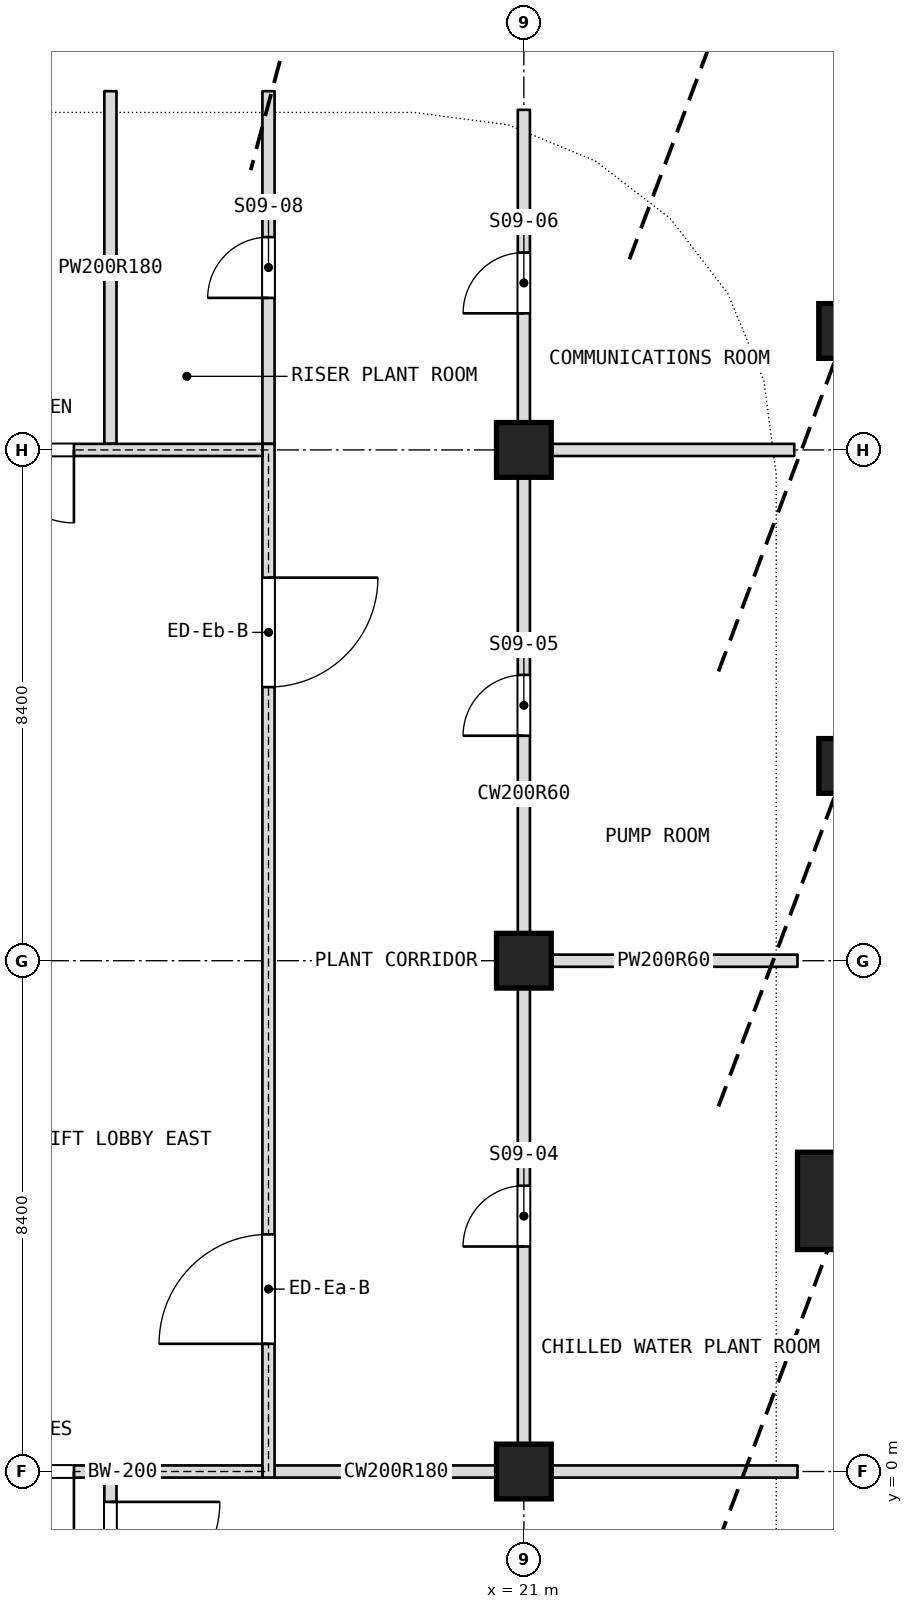
"""IFC4 building model, lengths in metres.
Left out: names, types, materials, properties, quantities, classifications, styles, units other than length and angle.
Written with IfcOpenShell. Run it as: python <this file> out.ifc"""

import sys

from ifc_helpers import new_model, si_unit, direction, frame, frame_2d, origin, origin_2d, place, context, subcontext, project, spatial, rectangle, extrude, element, fill, save


model = new_model("IFC4")
c1 = context("Model", 3, precision=1e-05, world=origin(), true_north=direction((0.0, 1.0)))
c2 = subcontext(c1, "Body", "Model", "MODEL_VIEW")
j1 = project(units=[si_unit("LENGTHUNIT", "METRE"), si_unit("PLANEANGLEUNIT", "RADIAN")], contexts=[c1])
p1 = place(None, origin())
s1 = spatial("IfcSite", under=j1, at=p1, CompositionType="ELEMENT")
p2 = place(p1, origin())
s2 = spatial("IfcBuilding", under=s1, at=p2, CompositionType="ELEMENT")
p3 = place(p2, frame((0.0, 0.0, 169.7)))
s3 = spatial("IfcBuildingStorey", under=s2, at=p3, CompositionType="ELEMENT", Elevation=169.7)
for number, where, z_axis, x_axis in (
    (1, (21.0, 0.0, 0.0), (0.0, 0.0, 1.0), (1.0, 0.0, 0.0)),
    (2, (21.0, 8.4, 0.0), (0.0, 0.0, 1.0), (1.0, 0.0, 0.0)),
    (3, (21.0, 16.8, 0.0), (0.0, 0.0, 1.0), (1.0, 0.0, 0.0)),
):
    element("IfcColumn", number, at=place(p3, frame(where, z_axis=z_axis, x_axis=x_axis)), inside=s3, PredefinedType="COLUMN", context=c2, shape_type="SweptSolid", body=[
        extrude(rectangle(XDim=0.9, YDim=0.9, at=origin_2d()), origin(), (0.0, 0.0, 1.0), 10.8),
    ])
p4 = place(p3, frame((21.0, -0.1, 0.0), z_axis=(0.0, 0.0, 1.0), x_axis=(0.0, 1.0, 0.0)))
e4 = element("IfcWall", 4, at=p4, inside=s3, PredefinedType="PARTITIONING", context=c2, shape_type="SweptSolid", body=[
    extrude(rectangle(XDim=22.493, YDim=0.2, at=frame_2d((11.247, 0.0))), origin(), (0.0, 0.0, 1.0), 10.14),
])
p5 = place(p4, frame((3.8, 0.0, 0.0)))
e5 = element("IfcOpeningElement", 5, at=p5, cuts=e4, PredefinedType="OPENING", context=c2, shape_type="SweptSolid", body=[
    extrude(rectangle(XDim=1.0, YDim=2.1, at=frame_2d((0.5, 1.05))), frame((0.0, 0.1, 0.0), z_axis=(0.0, -1.0, 0.0), x_axis=(1.0, 0.0, 0.0)), (0.0, 0.0, 1.0), 0.2),
])
p6 = place(p4, frame((12.2, 0.0, 0.0)))
e6 = element("IfcOpeningElement", 6, at=p6, cuts=e4, PredefinedType="OPENING", context=c2, shape_type="SweptSolid", body=[
    extrude(rectangle(XDim=1.0, YDim=2.1, at=frame_2d((0.5, 1.05))), frame((0.0, 0.1, 0.0), z_axis=(0.0, -1.0, 0.0), x_axis=(1.0, 0.0, 0.0)), (0.0, 0.0, 1.0), 0.2),
])
p7 = place(p4, frame((19.146, 0.0, 0.0)))
e7 = element("IfcOpeningElement", 7, at=p7, cuts=e4, PredefinedType="OPENING", context=c2, shape_type="SweptSolid", body=[
    extrude(rectangle(XDim=1.0, YDim=2.1, at=frame_2d((0.5, 1.05))), frame((0.0, 0.1, 0.0), z_axis=(0.0, -1.0, 0.0), x_axis=(1.0, 0.0, 0.0)), (0.0, 0.0, 1.0), 0.2),
])
p8 = place(p3, frame((16.8, 16.9, 0.0), z_axis=(0.0, 0.0, 1.0), x_axis=(0.0, 1.0, 0.0)))
e8 = element("IfcWall", 8, at=p8, inside=s3, PredefinedType="PARTITIONING", context=c2, shape_type="SweptSolid", body=[
    extrude(rectangle(XDim=5.8, YDim=0.2, at=frame_2d((2.9, 0.0))), origin(), (0.0, 0.0, 1.0), 10.14),
])
p9 = place(p8, frame((2.4, 0.0, 0.0)))
e9 = element("IfcOpeningElement", 9, at=p9, cuts=e8, PredefinedType="OPENING", context=c2, shape_type="SweptSolid", body=[
    extrude(rectangle(XDim=1.0, YDim=2.1, at=frame_2d((0.5, 1.05))), frame((0.0, 0.1, 0.0), z_axis=(0.0, -1.0, 0.0), x_axis=(1.0, 0.0, 0.0)), (0.0, 0.0, 1.0), 0.2),
])
p10 = place(p3, frame((14.2, -22.875, 0.0), z_axis=(0.0, 0.0, 1.0), x_axis=(0.0, 1.0, 0.0)))
e10 = element("IfcWall", 10, at=p10, inside=s3, PredefinedType="PARTITIONING", context=c2, shape_type="SweptSolid", body=[
    extrude(rectangle(XDim=22.775, YDim=0.2, at=frame_2d((11.387, 0.0))), origin(), (0.0, 0.0, 1.0), 10.54),
])
p11 = place(p10, frame((20.575, 0.0, 0.0)))
e11 = element("IfcOpeningElement", 11, at=p11, cuts=e10, PredefinedType="OPENING", context=c2, shape_type="SweptSolid", body=[
    extrude(rectangle(XDim=1.8, YDim=2.1, at=frame_2d((0.9, 1.05))), frame((0.0, 0.1, 0.0), z_axis=(0.0, -1.0, 0.0), x_axis=(1.0, 0.0, 0.0)), (0.0, 0.0, 1.0), 0.2),
])
p12 = place(p3, frame((14.2, 16.9, 0.0), z_axis=(0.0, 0.0, 1.0), x_axis=(0.0, 1.0, 0.0)))
e12 = element("IfcWall", 12, at=p12, inside=s3, PredefinedType="PARTITIONING", context=c2, shape_type="SweptSolid", body=[
    extrude(rectangle(XDim=5.8, YDim=0.2, at=frame_2d((2.9, 0.0))), origin(), (0.0, 0.0, 1.0), 10.54),
])
p13 = place(p3, frame((21.1, 0.0, 0.0), z_axis=(0.0, 0.0, 1.0), x_axis=(1.0, 0.0, 0.0)))
e13 = element("IfcWall", 13, at=p13, inside=s3, PredefinedType="PARTITIONING", context=c2, shape_type="SweptSolid", body=[
    extrude(rectangle(XDim=4.4, YDim=0.2, at=frame_2d((2.2, 0.0))), origin(), (0.0, 0.0, 1.0), 10.14),
])
p14 = place(p3, frame((16.9, 0.0, 0.0), z_axis=(0.0, 0.0, 1.0), x_axis=(1.0, 0.0, 0.0)))
e14 = element("IfcWall", 14, at=p14, inside=s3, PredefinedType="PARTITIONING", context=c2, shape_type="SweptSolid", body=[
    extrude(rectangle(XDim=4.0, YDim=0.2, at=frame_2d((2.0, 0.0))), origin(), (0.0, 0.0, 1.0), 10.14),
])
p15 = place(p3, frame((21.1, 8.4, 0.0), z_axis=(0.0, 0.0, 1.0), x_axis=(1.0, 0.0, 0.0)))
e15 = element("IfcWall", 15, at=p15, inside=s3, PredefinedType="PARTITIONING", context=c2, shape_type="SweptSolid", body=[
    extrude(rectangle(XDim=4.4, YDim=0.2, at=frame_2d((2.2, 0.0))), origin(), (0.0, 0.0, 1.0), 10.14),
])
p16 = place(p3, frame((21.1, 16.8, 0.0), z_axis=(0.0, 0.0, 1.0), x_axis=(1.0, 0.0, 0.0)))
e16 = element("IfcWall", 16, at=p16, inside=s3, PredefinedType="PARTITIONING", context=c2, shape_type="SweptSolid", body=[
    extrude(rectangle(XDim=4.347, YDim=0.2, at=frame_2d((2.173, 0.0))), origin(), (0.0, 0.0, 1.0), 10.14),
])
p17 = place(p3, frame((16.8, -0.1, 0.0), z_axis=(0.0, 0.0, 1.0), x_axis=(0.0, 1.0, 0.0)))
e17 = element("IfcWall", 17, at=p17, inside=s3, PredefinedType="PARTITIONING", context=c2, shape_type="SweptSolid", body=[
    extrude(rectangle(XDim=17.0, YDim=0.2, at=frame_2d((8.5, 0.0))), origin(), (0.0, 0.0, 1.0), 10.54),
])
p18 = place(p17, frame((2.2, 0.0, 0.0)))
e18 = element("IfcOpeningElement", 18, at=p18, cuts=e17, PredefinedType="OPENING", context=c2, shape_type="SweptSolid", body=[
    extrude(rectangle(XDim=1.8, YDim=2.1, at=frame_2d((0.9, 1.05))), frame((0.0, 0.1, 0.0), z_axis=(0.0, -1.0, 0.0), x_axis=(1.0, 0.0, 0.0)), (0.0, 0.0, 1.0), 0.2),
])
p19 = place(p17, frame((13.0, 0.0, 0.0)))
e19 = element("IfcOpeningElement", 19, at=p19, cuts=e17, PredefinedType="OPENING", context=c2, shape_type="SweptSolid", body=[
    extrude(rectangle(XDim=1.8, YDim=2.1, at=frame_2d((0.9, 1.05))), frame((0.0, 0.1, 0.0), z_axis=(0.0, -1.0, 0.0), x_axis=(1.0, 0.0, 0.0)), (0.0, 0.0, 1.0), 0.2),
])
p20 = place(p3, frame((12.1, 0.0, 0.0), z_axis=(0.0, 0.0, 1.0), x_axis=(1.0, 0.0, 0.0)))
e20 = element("IfcWall", 20, at=p20, inside=s3, PredefinedType="PARTITIONING", context=c2, shape_type="SweptSolid", body=[
    extrude(rectangle(XDim=4.6, YDim=0.2, at=frame_2d((2.3, 0.0))), origin(), (0.0, 0.0, 1.0), 10.14),
])
p21 = place(p20, frame((0.3, 0.0, 0.0)))
e21 = element("IfcOpeningElement", 21, at=p21, cuts=e20, PredefinedType="OPENING", context=c2, shape_type="SweptSolid", body=[
    extrude(rectangle(XDim=1.2, YDim=2.1, at=frame_2d((0.6, 1.05))), frame((0.0, 0.1, 0.0), z_axis=(0.0, -1.0, 0.0), x_axis=(1.0, 0.0, 0.0)), (0.0, 0.0, 1.0), 0.2),
])
p22 = place(p3, frame((12.1, 16.8, 0.0), z_axis=(0.0, 0.0, 1.0), x_axis=(1.0, 0.0, 0.0)))
e22 = element("IfcWall", 22, at=p22, inside=s3, PredefinedType="PARTITIONING", context=c2, shape_type="SweptSolid", body=[
    extrude(rectangle(XDim=4.6, YDim=0.2, at=frame_2d((2.3, 0.0))), origin(), (0.0, 0.0, 1.0), 10.14),
])
p23 = place(p22, frame((0.3, 0.0, 0.0)))
e23 = element("IfcOpeningElement", 23, at=p23, cuts=e22, PredefinedType="OPENING", context=c2, shape_type="SweptSolid", body=[
    extrude(rectangle(XDim=1.2, YDim=2.1, at=frame_2d((0.6, 1.05))), frame((0.0, 0.1, 0.0), z_axis=(0.0, -1.0, 0.0), x_axis=(1.0, 0.0, 0.0)), (0.0, 0.0, 1.0), 0.2),
])
p24 = place(p5, origin())
e24 = element("IfcDoor", 24, at=p24, inside=s3, OperationType="SINGLE_SWING_LEFT", PredefinedType="DOOR", context=c2, shape_type="SweptSolid", body=[
    extrude(rectangle(XDim=1.0, YDim=2.1, at=frame_2d((0.5, 1.05))), frame((0.0, 0.025, 0.0), z_axis=(0.0, -1.0, 0.0), x_axis=(1.0, 0.0, 0.0)), (0.0, 0.0, 1.0), 0.05),
])
fill(e5, e24)
p25 = place(p6, origin())
e25 = element("IfcDoor", 25, at=p25, inside=s3, OperationType="SINGLE_SWING_RIGHT", PredefinedType="DOOR", context=c2, shape_type="SweptSolid", body=[
    extrude(rectangle(XDim=1.0, YDim=2.1, at=frame_2d((0.5, 1.05))), frame((0.0, 0.025, 0.0), z_axis=(0.0, -1.0, 0.0), x_axis=(1.0, 0.0, 0.0)), (0.0, 0.0, 1.0), 0.05),
])
fill(e6, e25)
p26 = place(p7, origin())
e26 = element("IfcDoor", 26, at=p26, inside=s3, OperationType="SINGLE_SWING_LEFT", PredefinedType="DOOR", context=c2, shape_type="SweptSolid", body=[
    extrude(rectangle(XDim=1.0, YDim=2.1, at=frame_2d((0.5, 1.05))), frame((0.0, 0.025, 0.0), z_axis=(0.0, -1.0, 0.0), x_axis=(1.0, 0.0, 0.0)), (0.0, 0.0, 1.0), 0.05),
])
fill(e7, e26)
p27 = place(p9, origin())
e27 = element("IfcDoor", 27, at=p27, inside=s3, OperationType="SINGLE_SWING_RIGHT", PredefinedType="DOOR", context=c2, shape_type="SweptSolid", body=[
    extrude(rectangle(XDim=1.0, YDim=2.1, at=frame_2d((0.5, 1.05))), frame((0.0, 0.025, 0.0), z_axis=(0.0, -1.0, 0.0), x_axis=(1.0, 0.0, 0.0)), (0.0, 0.0, 1.0), 0.05),
])
fill(e9, e27)
p28 = place(p11, origin())
e28 = element("IfcDoor", 28, at=p28, inside=s3, OperationType="DOUBLE_DOOR_SINGLE_SWING", PredefinedType="DOOR", context=c2, shape_type="SweptSolid", body=[
    extrude(rectangle(XDim=1.8, YDim=2.1, at=frame_2d((0.9, 1.05))), frame((0.0, 0.025, 0.0), z_axis=(0.0, -1.0, 0.0), x_axis=(1.0, 0.0, 0.0)), (0.0, 0.0, 1.0), 0.05),
])
fill(e11, e28)
p29 = place(p18, origin())
e29 = element("IfcDoor", 29, at=p29, inside=s3, OperationType="DOUBLE_DOOR_SINGLE_SWING", PredefinedType="DOOR", context=c2, shape_type="SweptSolid", body=[
    extrude(rectangle(XDim=1.8, YDim=2.1, at=frame_2d((0.9, 1.05))), frame((0.0, 0.025, 0.0), z_axis=(0.0, -1.0, 0.0), x_axis=(1.0, 0.0, 0.0)), (0.0, 0.0, 1.0), 0.05),
])
fill(e18, e29)
p30 = place(p19, origin())
e30 = element("IfcDoor", 30, at=p30, inside=s3, OperationType="DOUBLE_DOOR_SINGLE_SWING", PredefinedType="DOOR", context=c2, shape_type="SweptSolid", body=[
    extrude(rectangle(XDim=1.8, YDim=2.1, at=frame_2d((0.9, 1.05))), frame((0.0, 0.025, 0.0), z_axis=(0.0, -1.0, 0.0), x_axis=(1.0, 0.0, 0.0)), (0.0, 0.0, 1.0), 0.05),
])
fill(e19, e30)
p31 = place(p21, origin())
e31 = element("IfcDoor", 31, at=p31, inside=s3, OperationType="SINGLE_SWING_LEFT", PredefinedType="DOOR", context=c2, shape_type="SweptSolid", body=[
    extrude(rectangle(XDim=1.2, YDim=2.1, at=frame_2d((0.6, 1.05))), frame((0.0, 0.025, 0.0), z_axis=(0.0, -1.0, 0.0), x_axis=(1.0, 0.0, 0.0)), (0.0, 0.0, 1.0), 0.05),
])
fill(e21, e31)
p32 = place(p23, origin())
e32 = element("IfcDoor", 32, at=p32, inside=s3, OperationType="SINGLE_SWING_LEFT", PredefinedType="DOOR", context=c2, shape_type="SweptSolid", body=[
    extrude(rectangle(XDim=1.2, YDim=2.1, at=frame_2d((0.6, 1.05))), frame((0.0, 0.025, 0.0), z_axis=(0.0, -1.0, 0.0), x_axis=(1.0, 0.0, 0.0)), (0.0, 0.0, 1.0), 0.05),
])
fill(e23, e32)
save(model, sys.argv[1])
